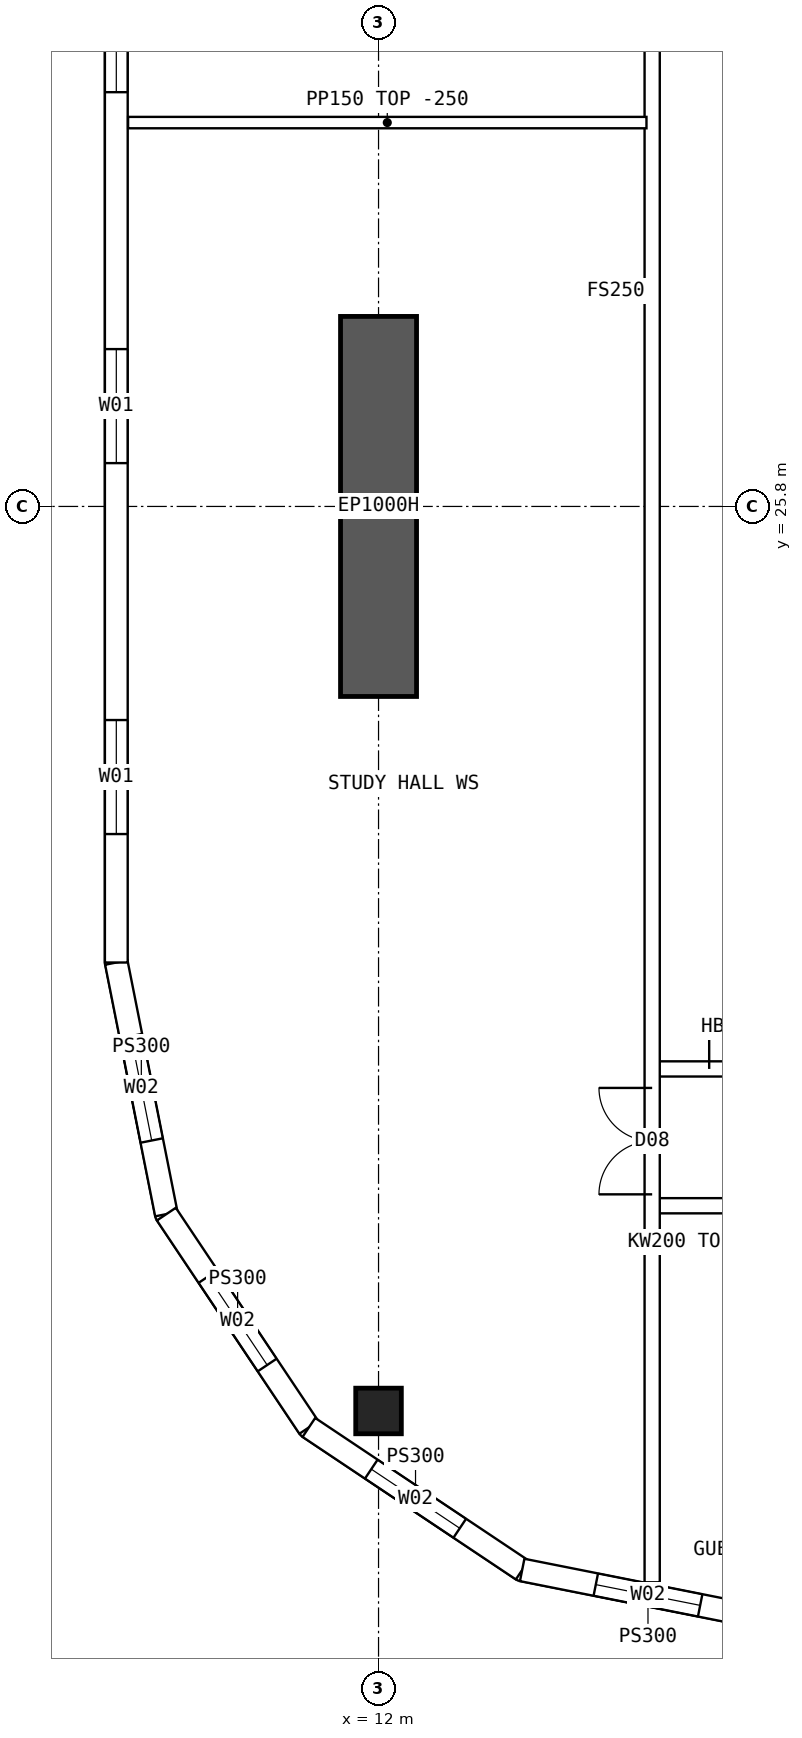
"""IFC4 building model, lengths in metres.
Left out: names, types, materials, properties, quantities, classifications, styles, units other than length and angle.
Written with IfcOpenShell. Run it as: python <this file> out.ifc"""

import sys

from ifc_helpers import new_model, si_unit, direction, frame, frame_2d, origin, origin_2d, place, context, subcontext, project, spatial, polyline, rectangle, hollow_rectangle, outline, extrude, element, fill, save


model = new_model("IFC4")
c1 = context("Model", 3, precision=1e-05, world=origin(), true_north=direction((0.0, 1.0)))
c2 = subcontext(c1, "Body", "Model", "MODEL_VIEW")
j1 = project(units=[si_unit("LENGTHUNIT", "METRE"), si_unit("PLANEANGLEUNIT", "RADIAN")], contexts=[c1])
p1 = place(None, origin())
s1 = spatial("IfcSite", under=j1, at=p1, CompositionType="ELEMENT")
p2 = place(p1, origin())
s2 = spatial("IfcBuilding", under=s1, at=p2, CompositionType="ELEMENT")
p3 = place(p2, frame((0.0, 0.0, 239.05)))
s3 = spatial("IfcBuildingStorey", under=s2, at=p3, CompositionType="ELEMENT", Elevation=239.05)
p4 = place(p3, frame((12.0, 13.9, 0.0), z_axis=(0.0, 0.0, 1.0), x_axis=(1.0, 0.0, 0.0)))
e1 = element("IfcColumn", 1, at=p4, inside=s3, PredefinedType="COLUMN", context=c2, shape_type="SweptSolid", body=[
    extrude(hollow_rectangle(XDim=0.6, YDim=0.6, WallThickness=0.06, at=origin_2d()), origin(), (0.0, 0.0, 1.0), 3.75),
])
p5 = place(p3, frame((12.0, 23.3, 0.0), z_axis=(0.0, 0.0, 1.0), x_axis=(0.0, 1.0, 0.0)))
e2 = element("IfcWall", 2, at=p5, inside=s3, PredefinedType="SHEAR", context=c2, shape_type="SweptSolid", body=[
    extrude(rectangle(XDim=5.0, YDim=1.0, at=frame_2d((2.5, 0.0))), origin(), (0.0, 0.0, 1.0), 3.75),
])
p6 = place(p3, frame((8.55, 44.2, 0.0), z_axis=(0.0, 0.0, 1.0), x_axis=(0.0, -1.0, 0.0)))
e3 = element("IfcWall", 3, at=p6, inside=s3, PredefinedType="SOLIDWALL", context=c2, shape_type="SweptSolid", body=[
    extrude(outline(polyline([(-0.015, -0.15), (24.415, -0.15), (24.385, 0.15), (0.015, 0.15), (-0.015, -0.15)])), origin(), (0.0, 0.0, 1.0), 3.5),
])
p7 = place(p6, frame((1.69, 0.0, 0.9)))
e4 = element("IfcOpeningElement", 4, at=p7, cuts=e3, PredefinedType="OPENING", context=c2, shape_type="SweptSolid", body=[
    extrude(rectangle(XDim=1.5, YDim=2.0, at=frame_2d((0.75, 1.0))), frame((0.0, 0.16, 0.0), z_axis=(0.0, -1.0, 0.0), x_axis=(1.0, 0.0, 0.0)), (0.0, 0.0, 1.0), 0.32),
])
p8 = place(p6, frame((6.57, 0.0, 0.9)))
e5 = element("IfcOpeningElement", 5, at=p8, cuts=e3, PredefinedType="OPENING", context=c2, shape_type="SweptSolid", body=[
    extrude(rectangle(XDim=1.5, YDim=2.0, at=frame_2d((0.75, 1.0))), frame((0.0, 0.16, 0.0), z_axis=(0.0, -1.0, 0.0), x_axis=(1.0, 0.0, 0.0)), (0.0, 0.0, 1.0), 0.32),
])
p9 = place(p6, frame((11.45, 0.0, 0.9)))
e6 = element("IfcOpeningElement", 6, at=p9, cuts=e3, PredefinedType="OPENING", context=c2, shape_type="SweptSolid", body=[
    extrude(rectangle(XDim=1.5, YDim=2.0, at=frame_2d((0.75, 1.0))), frame((0.0, 0.16, 0.0), z_axis=(0.0, -1.0, 0.0), x_axis=(1.0, 0.0, 0.0)), (0.0, 0.0, 1.0), 0.32),
])
p10 = place(p6, frame((16.33, 0.0, 0.9)))
e7 = element("IfcOpeningElement", 7, at=p10, cuts=e3, PredefinedType="OPENING", context=c2, shape_type="SweptSolid", body=[
    extrude(rectangle(XDim=1.5, YDim=2.0, at=frame_2d((0.75, 1.0))), frame((0.0, 0.16, 0.0), z_axis=(0.0, -1.0, 0.0), x_axis=(1.0, 0.0, 0.0)), (0.0, 0.0, 1.0), 0.32),
])
p11 = place(p6, frame((21.21, 0.0, 0.9)))
e8 = element("IfcOpeningElement", 8, at=p11, cuts=e3, PredefinedType="OPENING", context=c2, shape_type="SweptSolid", body=[
    extrude(rectangle(XDim=1.5, YDim=2.0, at=frame_2d((0.75, 1.0))), frame((0.0, 0.16, 0.0), z_axis=(0.0, -1.0, 0.0), x_axis=(1.0, 0.0, 0.0)), (0.0, 0.0, 1.0), 0.32),
])
p12 = place(p3, frame((8.55, 19.8, 0.0), z_axis=(0.0, 0.0, 1.0), x_axis=(0.19508664885, -0.980786011034, 0.0)))
e9 = element("IfcWall", 9, at=p12, inside=s3, PredefinedType="SOLIDWALL", context=c2, shape_type="SweptSolid", body=[
    extrude(outline(polyline([(-0.015, -0.15), (3.405, -0.15), (3.345, 0.15), (0.015, 0.15), (-0.015, -0.15)])), origin(), (0.0, 0.0, 1.0), 3.5),
])
p13 = place(p12, frame((0.988, 0.0, 0.9)))
e10 = element("IfcOpeningElement", 10, at=p13, cuts=e9, PredefinedType="OPENING", context=c2, shape_type="SweptSolid", body=[
    extrude(rectangle(XDim=1.4, YDim=1.8, at=frame_2d((0.7, 0.9))), frame((0.0, 0.16, 0.0), z_axis=(0.0, -1.0, 0.0), x_axis=(1.0, 0.0, 0.0)), (0.0, 0.0, 1.0), 0.32),
])
p14 = place(p3, frame((9.208, 16.49, 0.0), z_axis=(0.0, 0.0, 1.0), x_axis=(0.555567969291, -0.831471124873, 0.0)))
e11 = element("IfcWall", 11, at=p14, inside=s3, PredefinedType="SOLIDWALL", context=c2, shape_type="SweptSolid", body=[
    extrude(outline(polyline([(-0.03, -0.15), (3.405, -0.15), (3.345, 0.15), (0.03, 0.15), (-0.03, -0.15)])), origin(), (0.0, 0.0, 1.0), 3.5),
])
p15 = place(p14, frame((0.988, 0.0, 0.9)))
e12 = element("IfcOpeningElement", 12, at=p15, cuts=e11, PredefinedType="OPENING", context=c2, shape_type="SweptSolid", body=[
    extrude(rectangle(XDim=1.4, YDim=1.8, at=frame_2d((0.7, 0.9))), frame((0.0, 0.16, 0.0), z_axis=(0.0, -1.0, 0.0), x_axis=(1.0, 0.0, 0.0)), (0.0, 0.0, 1.0), 0.32),
])
p16 = place(p3, frame((11.083, 13.684, 0.0), z_axis=(0.0, 0.0, 1.0), x_axis=(0.831460037396, -0.555584562613, 0.0)))
e13 = element("IfcWall", 13, at=p16, inside=s3, PredefinedType="SOLIDWALL", context=c2, shape_type="SweptSolid", body=[
    extrude(outline(polyline([(-0.03, -0.15), (3.405, -0.15), (3.345, 0.15), (0.03, 0.15), (-0.03, -0.15)])), origin(), (0.0, 0.0, 1.0), 3.5),
])
p17 = place(p16, frame((0.988, 0.0, 0.9)))
e14 = element("IfcOpeningElement", 14, at=p17, cuts=e13, PredefinedType="OPENING", context=c2, shape_type="SweptSolid", body=[
    extrude(rectangle(XDim=1.4, YDim=1.8, at=frame_2d((0.7, 0.9))), frame((0.0, 0.16, 0.0), z_axis=(0.0, -1.0, 0.0), x_axis=(1.0, 0.0, 0.0)), (0.0, 0.0, 1.0), 0.32),
])
p18 = place(p3, frame((13.89, 11.808, 0.0), z_axis=(0.0, 0.0, 1.0), x_axis=(0.98078325777, -0.195100490205, 0.0)))
e15 = element("IfcWall", 15, at=p18, inside=s3, PredefinedType="SOLIDWALL", context=c2, shape_type="SweptSolid", body=[
    extrude(outline(polyline([(-0.03, -0.15), (3.405, -0.15), (3.345, 0.15), (0.03, 0.15), (-0.03, -0.15)])), origin(), (0.0, 0.0, 1.0), 3.5),
])
p19 = place(p18, frame((0.988, 0.0, 0.9)))
e16 = element("IfcOpeningElement", 16, at=p19, cuts=e15, PredefinedType="OPENING", context=c2, shape_type="SweptSolid", body=[
    extrude(rectangle(XDim=1.4, YDim=1.8, at=frame_2d((0.7, 0.9))), frame((0.0, 0.16, 0.0), z_axis=(0.0, -1.0, 0.0), x_axis=(1.0, 0.0, 0.0)), (0.0, 0.0, 1.0), 0.32),
])
p20 = place(p3, frame((15.6, 16.6, 0.0), z_axis=(0.0, 0.0, 1.0), x_axis=(1.0, 0.0, 0.0)))
e17 = element("IfcWall", 17, at=p20, inside=s3, PredefinedType="SOLIDWALL", context=c2, shape_type="SweptSolid", body=[
    extrude(rectangle(XDim=2.05, YDim=0.2, at=frame_2d((1.025, 0.0))), origin(), (0.0, 0.0, 1.0), 3.5),
])
p21 = place(p20, frame((0.95, 0.0, 0.0)))
e18 = element("IfcOpeningElement", 18, at=p21, cuts=e17, PredefinedType="OPENING", context=c2, shape_type="SweptSolid", body=[
    extrude(rectangle(XDim=0.9, YDim=2.1, at=frame_2d((0.45, 1.05))), frame((0.0, 0.11, 0.0), z_axis=(0.0, -1.0, 0.0), x_axis=(1.0, 0.0, 0.0)), (0.0, 0.0, 1.0), 0.22),
])
p22 = place(p3, frame((15.6, 18.4, 0.0), z_axis=(0.0, 0.0, 1.0), x_axis=(1.0, 0.0, 0.0)))
e19 = element("IfcWall", 19, at=p22, inside=s3, PredefinedType="SOLIDWALL", context=c2, shape_type="SweptSolid", body=[
    extrude(rectangle(XDim=2.05, YDim=0.2, at=frame_2d((1.025, 0.0))), origin(), (0.0, 0.0, 1.0), 3.5),
])
p23 = place(p22, frame((0.75, 0.0, 0.0)))
e20 = element("IfcOpeningElement", 20, at=p23, cuts=e19, PredefinedType="OPENING", context=c2, shape_type="SweptSolid", body=[
    extrude(rectangle(XDim=1.2, YDim=2.1, at=frame_2d((0.6, 1.05))), frame((0.0, 0.11, 0.0), z_axis=(0.0, -1.0, 0.0), x_axis=(1.0, 0.0, 0.0)), (0.0, 0.0, 1.0), 0.22),
])
p24 = place(p3, frame((8.705, 30.85, 0.0), z_axis=(0.0, 0.0, 1.0), x_axis=(1.0, 0.0, 0.0)))
e21 = element("IfcWall", 21, at=p24, inside=s3, PredefinedType="PARTITIONING", context=c2, shape_type="SweptSolid", body=[
    extrude(outline(polyline([(0.0, 0.0), (6.82, 0.0), (6.82, 3.5), (3.597, 3.5), (3.595, 3.05), (2.997, 3.05), (2.995, 3.5), (0.0, 3.5), (0.0, 0.0)])), frame((0.0, 0.075, 0.0), z_axis=(0.0, -1.0, 0.0), x_axis=(1.0, 0.0, 0.0)), (0.0, 0.0, 1.0), 0.15),
])
p25 = place(p3, frame((15.6, 11.646, 0.0), z_axis=(0.0, 0.0, 1.0), x_axis=(0.0, 1.0, 0.0)))
e22 = element("IfcWall", 22, at=p25, inside=s3, PredefinedType="SOLIDWALL", context=c2, shape_type="SweptSolid", body=[
    extrude(rectangle(XDim=40.708, YDim=0.2, at=frame_2d((20.354, 0.0))), origin(), (0.0, 0.0, 1.0), 3.5),
])
p26 = place(p25, frame((21.194, 0.0, 0.0)))
e23 = element("IfcOpeningElement", 23, at=p26, cuts=e22, PredefinedType="OPENING", context=c2, shape_type="SweptSolid", body=[
    extrude(rectangle(XDim=1.2, YDim=2.1, at=frame_2d((0.6, 1.05))), frame((0.0, 0.11, 0.0), z_axis=(0.0, -1.0, 0.0), x_axis=(1.0, 0.0, 0.0)), (0.0, 0.0, 1.0), 0.22),
])
p27 = place(p25, frame((5.104, 0.0, 0.0)))
e24 = element("IfcOpeningElement", 24, at=p27, cuts=e22, PredefinedType="OPENING", context=c2, shape_type="SweptSolid", body=[
    extrude(rectangle(XDim=1.4, YDim=2.1, at=frame_2d((0.7, 1.05))), frame((0.0, 0.11, 0.0), z_axis=(0.0, -1.0, 0.0), x_axis=(1.0, 0.0, 0.0)), (0.0, 0.0, 1.0), 0.22),
])
p28 = place(p25, frame((34.104, 0.0, 0.0)))
e25 = element("IfcOpeningElement", 25, at=p28, cuts=e22, PredefinedType="OPENING", context=c2, shape_type="SweptSolid", body=[
    extrude(rectangle(XDim=1.4, YDim=2.1, at=frame_2d((0.7, 1.05))), frame((0.0, 0.11, 0.0), z_axis=(0.0, -1.0, 0.0), x_axis=(1.0, 0.0, 0.0)), (0.0, 0.0, 1.0), 0.22),
])
p29 = place(p9, origin())
e26 = element("IfcWindow", 26, at=p29, inside=s3, PartitioningType="SINGLE_PANEL", PredefinedType="WINDOW", context=c2, shape_type="SweptSolid", body=[
    extrude(rectangle(XDim=1.5, YDim=2.0, at=frame_2d((0.75, 1.0))), frame((0.0, 0.03, 0.0), z_axis=(0.0, -1.0, 0.0), x_axis=(1.0, 0.0, 0.0)), (0.0, 0.0, 1.0), 0.06),
])
fill(e6, e26)
p30 = place(p10, origin())
e27 = element("IfcWindow", 27, at=p30, inside=s3, PartitioningType="SINGLE_PANEL", PredefinedType="WINDOW", context=c2, shape_type="SweptSolid", body=[
    extrude(rectangle(XDim=1.5, YDim=2.0, at=frame_2d((0.75, 1.0))), frame((0.0, 0.03, 0.0), z_axis=(0.0, -1.0, 0.0), x_axis=(1.0, 0.0, 0.0)), (0.0, 0.0, 1.0), 0.06),
])
fill(e7, e27)
p31 = place(p11, origin())
e28 = element("IfcWindow", 28, at=p31, inside=s3, PartitioningType="SINGLE_PANEL", PredefinedType="WINDOW", context=c2, shape_type="SweptSolid", body=[
    extrude(rectangle(XDim=1.5, YDim=2.0, at=frame_2d((0.75, 1.0))), frame((0.0, 0.03, 0.0), z_axis=(0.0, -1.0, 0.0), x_axis=(1.0, 0.0, 0.0)), (0.0, 0.0, 1.0), 0.06),
])
fill(e8, e28)
p32 = place(p13, origin())
e29 = element("IfcWindow", 29, at=p32, inside=s3, PartitioningType="SINGLE_PANEL", PredefinedType="WINDOW", context=c2, shape_type="SweptSolid", body=[
    extrude(rectangle(XDim=1.4, YDim=1.8, at=frame_2d((0.7, 0.9))), frame((0.0, 0.03, 0.0), z_axis=(0.0, -1.0, 0.0), x_axis=(1.0, 0.0, 0.0)), (0.0, 0.0, 1.0), 0.06),
])
fill(e10, e29)
p33 = place(p15, origin())
e30 = element("IfcWindow", 30, at=p33, inside=s3, PartitioningType="SINGLE_PANEL", PredefinedType="WINDOW", context=c2, shape_type="SweptSolid", body=[
    extrude(rectangle(XDim=1.4, YDim=1.8, at=frame_2d((0.7, 0.9))), frame((0.0, 0.03, 0.0), z_axis=(0.0, -1.0, 0.0), x_axis=(1.0, 0.0, 0.0)), (0.0, 0.0, 1.0), 0.06),
])
fill(e12, e30)
p34 = place(p17, origin())
e31 = element("IfcWindow", 31, at=p34, inside=s3, PartitioningType="SINGLE_PANEL", PredefinedType="WINDOW", context=c2, shape_type="SweptSolid", body=[
    extrude(rectangle(XDim=1.4, YDim=1.8, at=frame_2d((0.7, 0.9))), frame((0.0, 0.03, 0.0), z_axis=(0.0, -1.0, 0.0), x_axis=(1.0, 0.0, 0.0)), (0.0, 0.0, 1.0), 0.06),
])
fill(e14, e31)
p35 = place(p19, origin())
e32 = element("IfcWindow", 32, at=p35, inside=s3, PartitioningType="SINGLE_PANEL", PredefinedType="WINDOW", context=c2, shape_type="SweptSolid", body=[
    extrude(rectangle(XDim=1.4, YDim=1.8, at=frame_2d((0.7, 0.9))), frame((0.0, 0.03, 0.0), z_axis=(0.0, -1.0, 0.0), x_axis=(1.0, 0.0, 0.0)), (0.0, 0.0, 1.0), 0.06),
])
fill(e16, e32)
p36 = place(p23, origin())
e33 = element("IfcDoor", 33, at=p36, inside=s3, OperationType="DOUBLE_DOOR_SINGLE_SWING", PredefinedType="DOOR", context=c2, shape_type="SweptSolid", body=[
    extrude(rectangle(XDim=1.2, YDim=2.1, at=frame_2d((0.6, 1.05))), frame((0.0, 0.025, 0.0), z_axis=(0.0, -1.0, 0.0), x_axis=(1.0, 0.0, 0.0)), (0.0, 0.0, 1.0), 0.05),
])
fill(e20, e33)
p37 = place(p27, origin())
e34 = element("IfcDoor", 34, at=p37, inside=s3, OperationType="DOUBLE_DOOR_SINGLE_SWING", PredefinedType="DOOR", context=c2, shape_type="SweptSolid", body=[
    extrude(rectangle(XDim=1.4, YDim=2.1, at=frame_2d((0.7, 1.05))), frame((0.0, 0.025, 0.0), z_axis=(0.0, -1.0, 0.0), x_axis=(1.0, 0.0, 0.0)), (0.0, 0.0, 1.0), 0.05),
])
fill(e24, e34)
save(model, sys.argv[1])
